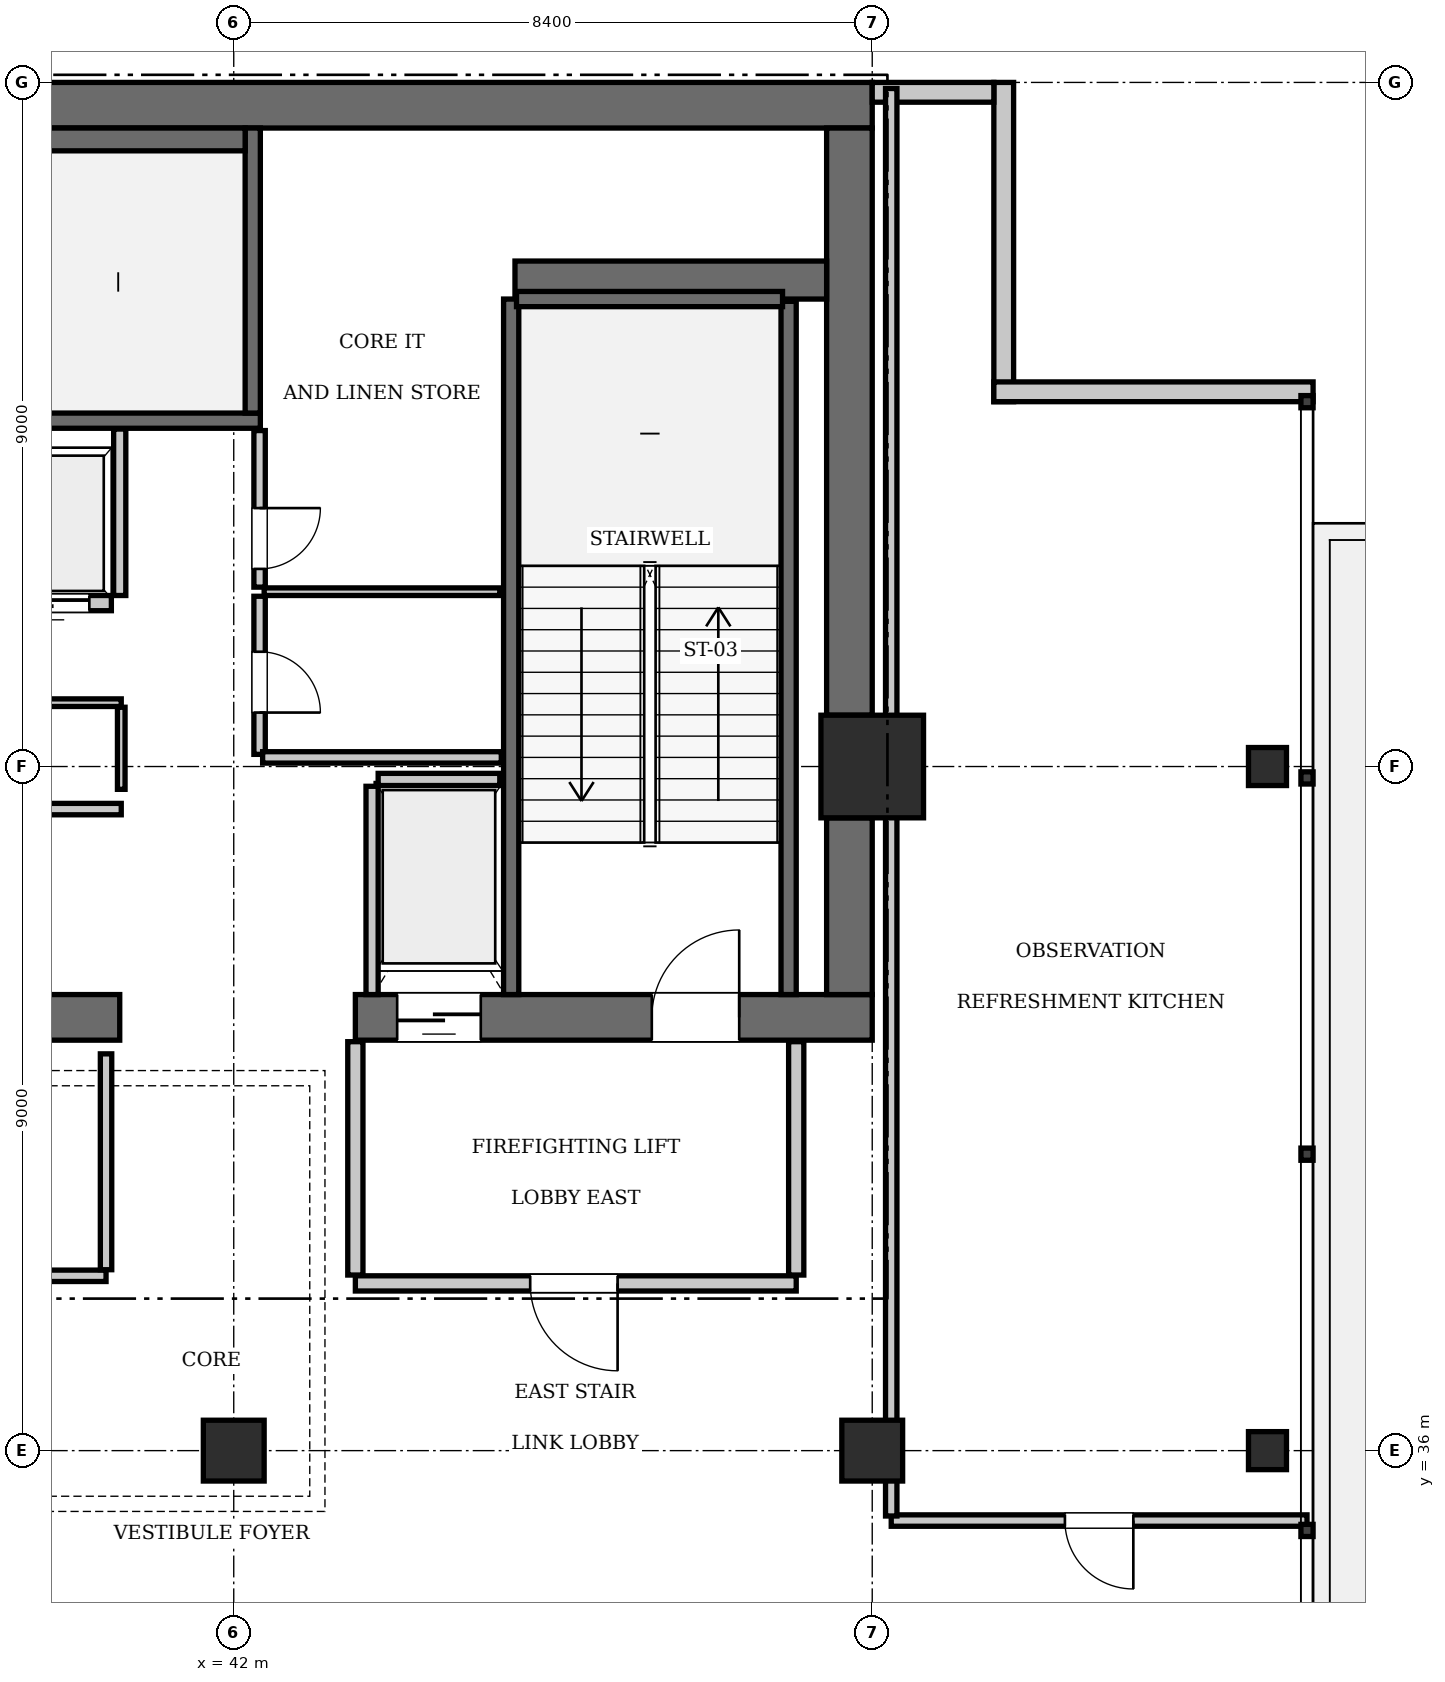
"""IFC4 building model, lengths in metres.
Left out: names, types, materials, properties, quantities, classifications, styles, units other than length and angle.
Written with IfcOpenShell. Run it as: python <this file> out.ifc"""

import sys

from ifc_helpers import new_model, si_unit, direction, frame, frame_2d, origin, origin_2d, place, context, subcontext, project, spatial, rectangle, i_section, extrude, element, fill, save


model = new_model("IFC4")
c1 = context("Model", 3, precision=1e-05, world=origin(), true_north=direction((0.0, 1.0)))
c2 = subcontext(c1, "Body", "Model", "MODEL_VIEW")
j1 = project(units=[si_unit("LENGTHUNIT", "METRE"), si_unit("PLANEANGLEUNIT", "RADIAN")], contexts=[c1])
p1 = place(None, origin())
s1 = spatial("IfcSite", under=j1, at=p1, CompositionType="ELEMENT")
p2 = place(p1, origin())
s2 = spatial("IfcBuilding", under=s1, at=p2, CompositionType="ELEMENT")
p3 = place(p2, frame((0.0, 0.0, 354.2)))
s3 = spatial("IfcBuildingStorey", under=s2, at=p3, CompositionType="ELEMENT", Elevation=354.2)
p4 = place(p3, frame((50.4, 45.0, 0.0), z_axis=(0.0, 0.0, 1.0), x_axis=(1.0, 0.0, 0.0)))
e1 = element("IfcColumn", 1, at=p4, inside=s3, PredefinedType="COLUMN", context=c2, shape_type="SweptSolid", body=[
    extrude(rectangle(XDim=1.35, YDim=1.35, at=origin_2d()), origin(), (0.0, 0.0, 1.0), 4.9),
])
p5 = place(p3, frame((25.2, 53.7, 0.0), z_axis=(0.0, 0.0, 1.0), x_axis=(1.0, 0.0, 0.0)))
e2 = element("IfcWall", 2, at=p5, inside=s3, PredefinedType="SHEAR", context=c2, shape_type="SweptSolid", body=[
    extrude(rectangle(XDim=25.2, YDim=0.6, at=frame_2d((12.6, 0.0))), origin(), (0.0, 0.0, 1.0), 4.9),
])
p6 = place(p3, frame((35.1, 41.7, 0.0), z_axis=(0.0, 0.0, 1.0), x_axis=(1.0, 0.0, 0.0)))
e3 = element("IfcWall", 3, at=p6, inside=s3, PredefinedType="SHEAR", context=c2, shape_type="SweptSolid", body=[
    extrude(rectangle(XDim=5.4, YDim=0.6, at=frame_2d((2.7, 0.0))), origin(), (0.0, 0.0, 1.0), 4.9),
])
p7 = place(p3, frame((43.6, 41.7, 0.0), z_axis=(0.0, 0.0, 1.0), x_axis=(1.0, 0.0, 0.0)))
e4 = element("IfcWall", 4, at=p7, inside=s3, PredefinedType="SHEAR", context=c2, shape_type="SweptSolid", body=[
    extrude(rectangle(XDim=6.8, YDim=0.6, at=frame_2d((3.4, 0.0))), origin(), (0.0, 0.0, 1.0), 4.9),
])
p8 = place(p7, frame((3.9, 0.0, 0.0)))
e5 = element("IfcOpeningElement", 5, at=p8, cuts=e4, PredefinedType="OPENING", context=c2, shape_type="SweptSolid", body=[
    extrude(rectangle(XDim=1.15, YDim=2.15, at=frame_2d((0.575, 1.075))), frame((0.0, 0.31, 0.0), z_axis=(0.0, -1.0, 0.0), x_axis=(1.0, 0.0, 0.0)), (0.0, 0.0, 1.0), 0.62),
])
p9 = place(p7, frame((0.55, 0.0, 0.0)))
e6 = element("IfcOpeningElement", 6, at=p9, cuts=e4, PredefinedType="OPENING", context=c2, shape_type="SweptSolid", body=[
    extrude(rectangle(XDim=1.1, YDim=2.2, at=frame_2d((0.55, 1.1))), frame((0.0, 0.31, 0.0), z_axis=(0.0, -1.0, 0.0), x_axis=(1.0, 0.0, 0.0)), (0.0, 0.0, 1.0), 0.62),
])
p10 = place(p3, frame((50.1, 42.0, 0.0), z_axis=(0.0, 0.0, 1.0), x_axis=(0.0, 1.0, 0.0)))
e7 = element("IfcWall", 7, at=p10, inside=s3, PredefinedType="SHEAR", context=c2, shape_type="SweptSolid", body=[
    extrude(rectangle(XDim=2.325, YDim=0.6, at=frame_2d((1.163, 0.0))), origin(), (0.0, 0.0, 1.0), 4.9),
])
p11 = place(p3, frame((50.1, 45.675, 0.0), z_axis=(0.0, 0.0, 1.0), x_axis=(0.0, 1.0, 0.0)))
e8 = element("IfcWall", 8, at=p11, inside=s3, PredefinedType="SHEAR", context=c2, shape_type="SweptSolid", body=[
    extrude(rectangle(XDim=7.725, YDim=0.6, at=frame_2d((3.862, 0.0))), origin(), (0.0, 0.0, 1.0), 4.9),
])
p12 = place(p3, frame((45.7, 51.4, 0.0), z_axis=(0.0, 0.0, 1.0), x_axis=(1.0, 0.0, 0.0)))
e9 = element("IfcWall", 9, at=p12, inside=s3, PredefinedType="SHEAR", context=c2, shape_type="SweptSolid", body=[
    extrude(rectangle(XDim=4.1, YDim=0.5, at=frame_2d((2.05, 0.0))), origin(), (0.0, 0.0, 1.0), 4.9),
])
for number, where, z_axis, x_axis in (
    (10, (42.0, 36.0, 0.0), (0.0, 0.0, 1.0), (1.0, 0.0, 0.0)),
    (11, (50.4, 36.0, 0.0), (0.0, 0.0, 1.0), (1.0, 0.0, 0.0)),
):
    element("IfcColumn", number, at=place(p3, frame(where, z_axis=z_axis, x_axis=x_axis)), inside=s3, PredefinedType="COLUMN", context=c2, shape_type="SweptSolid", body=[
        extrude(rectangle(XDim=0.8, YDim=0.8, at=origin_2d()), origin(), (0.0, 0.0, 1.0), 4.9),
    ])
for number, where, z_axis, x_axis in (
    (12, (55.6, 36.0, -0.26), (0.0, 0.0, 1.0), (1.0, 0.0, 0.0)),
    (13, (55.6, 45.0, -0.26), (0.0, 0.0, 1.0), (1.0, 0.0, 0.0)),
):
    element("IfcColumn", number, at=place(p3, frame(where, z_axis=z_axis, x_axis=x_axis)), inside=s3, PredefinedType="COLUMN", context=c2, shape_type="SweptSolid", body=[
        extrude(i_section(OverallWidth=0.5, OverallDepth=0.5, WebThickness=0.022, FlangeThickness=0.032, at=origin_2d()), origin(), (0.0, 0.0, 1.0), 5.16),
    ])
p13 = place(p3, frame((33.25, 49.55, 0.0), z_axis=(0.0, 0.0, 1.0), x_axis=(1.0, 0.0, 0.0)))
e14 = element("IfcWall", 14, at=p13, inside=s3, PredefinedType="SOLIDWALL", context=c2, shape_type="SweptSolid", body=[
    extrude(rectangle(XDim=9.1, YDim=0.2, at=frame_2d((4.55, 0.0))), origin(), (0.0, 0.0, 1.0), 4.64),
])
p14 = place(p3, frame((42.25, 49.65, 0.0), z_axis=(0.0, 0.0, 1.0), x_axis=(0.0, 1.0, 0.0)))
e15 = element("IfcWall", 15, at=p14, inside=s3, PredefinedType="SOLIDWALL", context=c2, shape_type="SweptSolid", body=[
    extrude(rectangle(XDim=3.75, YDim=0.2, at=frame_2d((1.875, 0.0))), origin(), (0.0, 0.0, 1.0), 4.64),
])
p15 = place(p3, frame((33.45, 53.25, 0.0), z_axis=(0.0, 0.0, 1.0), x_axis=(1.0, 0.0, 0.0)))
e16 = element("IfcWall", 16, at=p15, inside=s3, PredefinedType="SOLIDWALL", context=c2, shape_type="SweptSolid", body=[
    extrude(rectangle(XDim=8.7, YDim=0.3, at=frame_2d((4.35, 0.0))), origin(), (0.0, 0.0, 1.0), 4.64),
])
p16 = place(p3, frame((45.65, 42.0, 0.0), z_axis=(0.0, 0.0, 1.0), x_axis=(0.0, 1.0, 0.0)))
e17 = element("IfcWall", 17, at=p16, inside=s3, PredefinedType="SOLIDWALL", context=c2, shape_type="SweptSolid", body=[
    extrude(rectangle(XDim=9.15, YDim=0.2, at=frame_2d((4.575, 0.0))), origin(), (0.0, 0.0, 1.0), 4.64),
])
p17 = place(p3, frame((49.3, 42.0, 0.0), z_axis=(0.0, 0.0, 1.0), x_axis=(0.0, 1.0, 0.0)))
e18 = element("IfcWall", 18, at=p17, inside=s3, PredefinedType="SOLIDWALL", context=c2, shape_type="SweptSolid", body=[
    extrude(rectangle(XDim=9.12, YDim=0.2, at=frame_2d((4.56, 0.0))), origin(), (0.0, 0.0, 1.0), 4.64),
])
p18 = place(p3, frame((45.72, 51.15, 0.0), z_axis=(0.0, 0.0, 1.0), x_axis=(1.0, 0.0, 0.0)))
e19 = element("IfcWall", 19, at=p18, inside=s3, PredefinedType="SOLIDWALL", context=c2, shape_type="SweptSolid", body=[
    extrude(rectangle(XDim=3.5, YDim=0.2, at=frame_2d((1.75, 0.0))), origin(), (0.0, 0.0, 1.0), 4.64),
])
p19 = place(p3, frame((38.71, 47.15, 0.0), z_axis=(0.0, 0.0, 1.0), x_axis=(1.0, 0.0, 0.0)))
e20 = element("IfcWall", 20, at=p19, inside=s3, PredefinedType="SOLIDWALL", context=c2, shape_type="SweptSolid", body=[
    extrude(rectangle(XDim=1.68, YDim=0.2, at=frame_2d((0.84, 0.0))), origin(), (0.0, 0.0, 1.0), 4.64),
])
p20 = place(p19, frame((0.29, 0.0, 0.0)))
e21 = element("IfcOpeningElement", 21, at=p20, cuts=e20, PredefinedType="OPENING", context=c2, shape_type="SweptSolid", body=[
    extrude(rectangle(XDim=1.1, YDim=2.2, at=frame_2d((0.55, 1.1))), frame((0.0, 0.11, 0.0), z_axis=(0.0, -1.0, 0.0), x_axis=(1.0, 0.0, 0.0)), (0.0, 0.0, 1.0), 0.22),
])
p21 = place(p3, frame((43.9, 44.83, 0.0), z_axis=(0.0, 0.0, 1.0), x_axis=(1.0, 0.0, 0.0)))
e22 = element("IfcWall", 22, at=p21, inside=s3, PredefinedType="SOLIDWALL", context=c2, shape_type="SweptSolid", body=[
    extrude(rectangle(XDim=1.6, YDim=0.16, at=frame_2d((0.8, 0.0))), origin(), (0.0, 0.0, 1.0), 4.64),
])
p22 = place(p3, frame((43.82, 42.0, 0.0), z_axis=(0.0, 0.0, 1.0), x_axis=(0.0, 1.0, 0.0)))
e23 = element("IfcWall", 23, at=p22, inside=s3, PredefinedType="SOLIDWALL", context=c2, shape_type="SweptSolid", body=[
    extrude(rectangle(XDim=2.74, YDim=0.16, at=frame_2d((1.37, 0.0))), origin(), (0.0, 0.0, 1.0), 4.64),
])
p23 = place(p3, frame((40.5, 47.25, 0.0), z_axis=(0.0, 0.0, 1.0), x_axis=(0.0, 1.0, 0.0)))
e24 = element("IfcWall", 24, at=p23, inside=s3, PredefinedType="SOLIDWALL", context=c2, shape_type="SweptSolid", body=[
    extrude(rectangle(XDim=2.19, YDim=0.16, at=frame_2d((1.095, 0.0))), origin(), (0.0, 0.0, 1.0), 4.64),
])
for number, where, z_axis, x_axis in (
    (25, (52.13, 54.0, 0.0), (0.0, 0.0, 1.0), (0.0, -1.0, 0.0)),
    (26, (52.0, 49.93, 0.0), (0.0, 0.0, 1.0), (1.0, 0.0, 0.0)),
):
    element("IfcWall", number, at=place(p3, frame(where, z_axis=z_axis, x_axis=x_axis)), inside=s3, PredefinedType="SOLIDWALL", context=c2, shape_type="SweptSolid", body=[
        extrude(rectangle(XDim=4.2, YDim=0.26, at=frame_2d((2.1, 0.0))), origin(), (0.0, 0.0, 1.0), 4.64),
    ])
p24 = place(p3, frame((52.0, 53.87, 0.0), z_axis=(0.0, 0.0, 1.0), x_axis=(-1.0, 0.0, 0.0)))
e27 = element("IfcWall", 27, at=p24, inside=s3, PredefinedType="SOLIDWALL", context=c2, shape_type="SweptSolid", body=[
    extrude(rectangle(XDim=1.6, YDim=0.26, at=frame_2d((0.8, 0.0))), origin(), (0.0, 0.0, 1.0), 4.64),
])
p25 = place(p3, frame((43.6, 38.2, 0.0), z_axis=(0.0, 0.0, 1.0), x_axis=(1.0, 0.0, 0.0)))
e28 = element("IfcWall", 28, at=p25, inside=s3, PredefinedType="PARTITIONING", context=c2, shape_type="SweptSolid", body=[
    extrude(rectangle(XDim=5.8, YDim=0.2, at=frame_2d((2.9, 0.0))), origin(), (0.0, 0.0, 1.0), 4.64),
])
p26 = place(p25, frame((2.3, 0.0, 0.0)))
e29 = element("IfcOpeningElement", 29, at=p26, cuts=e28, PredefinedType="OPENING", context=c2, shape_type="SweptSolid", body=[
    extrude(rectangle(XDim=1.15, YDim=2.15, at=frame_2d((0.575, 1.075))), frame((0.0, 0.11, 0.0), z_axis=(0.0, -1.0, 0.0), x_axis=(1.0, 0.0, 0.0)), (0.0, 0.0, 1.0), 0.22),
])
for number, where, z_axis, x_axis in (
    (30, (43.6, 38.31, 0.0), (0.0, 0.0, 1.0), (0.0, 1.0, 0.0)),
    (31, (49.4, 38.31, 0.0), (0.0, 0.0, 1.0), (0.0, 1.0, 0.0)),
):
    element("IfcWall", number, at=place(p3, frame(where, z_axis=z_axis, x_axis=x_axis)), inside=s3, PredefinedType="PARTITIONING", context=c2, shape_type="SweptSolid", body=[
        extrude(rectangle(XDim=3.07, YDim=0.2, at=frame_2d((1.535, 0.0))), origin(), (0.0, 0.0, 1.0), 4.64),
    ])
p27 = place(p3, frame((35.58, 45.84, 0.0), z_axis=(0.0, 0.0, 1.0), x_axis=(1.0, 0.0, 0.0)))
e32 = element("IfcWall", 32, at=p27, inside=s3, PredefinedType="PARTITIONING", context=c2, shape_type="SweptSolid", body=[
    extrude(rectangle(XDim=4.94, YDim=0.1, at=frame_2d((2.47, 0.0))), origin(), (0.0, 0.0, 1.0), 4.64),
])
p28 = place(p27, frame((1.8, 0.0, 0.0)))
e33 = element("IfcOpeningElement", 33, at=p28, cuts=e32, PredefinedType="OPENING", context=c2, shape_type="SweptSolid", body=[
    extrude(rectangle(XDim=0.8, YDim=2.05, at=frame_2d((0.4, 1.025))), frame((0.0, 0.06, 0.0), z_axis=(0.0, -1.0, 0.0), x_axis=(1.0, 0.0, 0.0)), (0.0, 0.0, 1.0), 0.12),
])
p29 = place(p3, frame((40.52, 44.7, 0.0), z_axis=(0.0, 0.0, 1.0), x_axis=(0.0, 1.0, 0.0)))
e34 = element("IfcWall", 34, at=p29, inside=s3, PredefinedType="PARTITIONING", context=c2, shape_type="SweptSolid", body=[
    extrude(rectangle(XDim=1.08, YDim=0.1, at=frame_2d((0.54, 0.0))), origin(), (0.0, 0.0, 1.0), 4.64),
])
p30 = place(p3, frame((38.04, 44.44, 0.0), z_axis=(0.0, 0.0, 1.0), x_axis=(1.0, 0.0, 0.0)))
e35 = element("IfcWall", 35, at=p30, inside=s3, PredefinedType="PARTITIONING", context=c2, shape_type="SweptSolid", body=[
    extrude(rectangle(XDim=2.48, YDim=0.15, at=frame_2d((1.24, 0.0))), origin(), (0.0, 0.0, 1.0), 4.64),
])
p31 = place(p30, frame((0.75, 0.0, 0.0)))
e36 = element("IfcOpeningElement", 36, at=p31, cuts=e35, PredefinedType="OPENING", context=c2, shape_type="SweptSolid", body=[
    extrude(rectangle(XDim=0.8, YDim=2.05, at=frame_2d((0.4, 1.025))), frame((0.0, 0.085, 0.0), z_axis=(0.0, -1.0, 0.0), x_axis=(1.0, 0.0, 0.0)), (0.0, 0.0, 1.0), 0.17),
])
p32 = place(p3, frame((42.34, 45.16, 0.0), z_axis=(0.0, 0.0, 1.0), x_axis=(0.0, 1.0, 0.0)))
e37 = element("IfcWall", 37, at=p32, inside=s3, PredefinedType="PARTITIONING", context=c2, shape_type="SweptSolid", body=[
    extrude(rectangle(XDim=2.08, YDim=0.15, at=frame_2d((1.04, 0.0))), origin(), (0.0, 0.0, 1.0), 4.64),
])
p33 = place(p32, frame((0.55, 0.0, 0.0)))
e38 = element("IfcOpeningElement", 38, at=p33, cuts=e37, PredefinedType="OPENING", context=c2, shape_type="SweptSolid", body=[
    extrude(rectangle(XDim=0.8, YDim=2.05, at=frame_2d((0.4, 1.025))), frame((0.0, 0.085, 0.0), z_axis=(0.0, -1.0, 0.0), x_axis=(1.0, 0.0, 0.0)), (0.0, 0.0, 1.0), 0.17),
])
p34 = place(p3, frame((42.34, 47.36, 0.0), z_axis=(0.0, 0.0, 1.0), x_axis=(0.0, 1.0, 0.0)))
e39 = element("IfcWall", 39, at=p34, inside=s3, PredefinedType="PARTITIONING", context=c2, shape_type="SweptSolid", body=[
    extrude(rectangle(XDim=2.06, YDim=0.15, at=frame_2d((1.03, 0.0))), origin(), (0.0, 0.0, 1.0), 4.64),
])
p35 = place(p34, frame((0.24, 0.0, 0.0)))
e40 = element("IfcOpeningElement", 40, at=p35, cuts=e39, PredefinedType="OPENING", context=c2, shape_type="SweptSolid", body=[
    extrude(rectangle(XDim=0.8, YDim=2.05, at=frame_2d((0.4, 1.025))), frame((0.0, 0.085, 0.0), z_axis=(0.0, -1.0, 0.0), x_axis=(1.0, 0.0, 0.0)), (0.0, 0.0, 1.0), 0.17),
])
p36 = place(p3, frame((42.4, 47.3, 0.0), z_axis=(0.0, 0.0, 1.0), x_axis=(1.0, 0.0, 0.0)))
e41 = element("IfcWall", 41, at=p36, inside=s3, PredefinedType="PARTITIONING", context=c2, shape_type="SweptSolid", body=[
    extrude(rectangle(XDim=3.1, YDim=0.1, at=frame_2d((1.55, 0.0))), origin(), (0.0, 0.0, 1.0), 4.64),
])
p37 = place(p3, frame((42.38, 45.12, 0.0), z_axis=(0.0, 0.0, 1.0), x_axis=(1.0, 0.0, 0.0)))
e42 = element("IfcWall", 42, at=p37, inside=s3, PredefinedType="PARTITIONING", context=c2, shape_type="SweptSolid", body=[
    extrude(rectangle(XDim=3.14, YDim=0.15, at=frame_2d((1.57, 0.0))), origin(), (0.0, 0.0, 1.0), 4.64),
])
p38 = place(p3, frame((34.4, 38.3, 0.0), z_axis=(0.0, 0.0, 1.0), x_axis=(1.0, 0.0, 0.0)))
e43 = element("IfcWall", 43, at=p38, inside=s3, PredefinedType="PARTITIONING", context=c2, shape_type="SweptSolid", body=[
    extrude(rectangle(XDim=5.92, YDim=0.15, at=frame_2d((2.96, 0.0))), origin(), (0.0, 0.0, 1.0), 4.64),
])
p39 = place(p38, frame((2.4, 0.0, 0.0)))
e44 = element("IfcOpeningElement", 44, at=p39, cuts=e43, PredefinedType="OPENING", context=c2, shape_type="SweptSolid", body=[
    extrude(rectangle(XDim=0.9, YDim=2.1, at=frame_2d((0.45, 1.05))), frame((0.0, 0.085, 0.0), z_axis=(0.0, -1.0, 0.0), x_axis=(1.0, 0.0, 0.0)), (0.0, 0.0, 1.0), 0.17),
])
p40 = place(p3, frame((40.32, 38.38, 0.0), z_axis=(0.0, 0.0, 1.0), x_axis=(0.0, 1.0, 0.0)))
e45 = element("IfcWall", 45, at=p40, inside=s3, PredefinedType="PARTITIONING", context=c2, shape_type="SweptSolid", body=[
    extrude(rectangle(XDim=2.84, YDim=0.15, at=frame_2d((1.42, 0.0))), origin(), (0.0, 0.0, 1.0), 4.64),
])
p41 = place(p3, frame((50.65, 35.08, 0.0), z_axis=(0.0, 0.0, 1.0), x_axis=(1.0, 0.0, 0.0)))
e46 = element("IfcWall", 46, at=p41, inside=s3, PredefinedType="PARTITIONING", context=c2, shape_type="SweptSolid", body=[
    extrude(rectangle(XDim=5.47, YDim=0.15, at=frame_2d((2.735, 0.0))), origin(), (0.0, 0.0, 1.0), 4.64),
])
p42 = place(p41, frame((2.285, 0.0, 0.0)))
e47 = element("IfcOpeningElement", 47, at=p42, cuts=e46, PredefinedType="OPENING", context=c2, shape_type="SweptSolid", body=[
    extrude(rectangle(XDim=0.9, YDim=2.1, at=frame_2d((0.45, 1.05))), frame((0.0, 0.085, 0.0), z_axis=(0.0, -1.0, 0.0), x_axis=(1.0, 0.0, 0.0)), (0.0, 0.0, 1.0), 0.17),
])
p43 = place(p3, frame((50.65, 35.14, 0.0), z_axis=(0.0, 0.0, 1.0), x_axis=(0.0, 1.0, 0.0)))
e48 = element("IfcWall", 48, at=p43, inside=s3, PredefinedType="PARTITIONING", context=c2, shape_type="SweptSolid", body=[
    extrude(rectangle(XDim=18.78, YDim=0.15, at=frame_2d((9.39, 0.0))), origin(), (0.0, 0.0, 1.0), 4.64),
])
p44 = place(p8, origin())
e49 = element("IfcDoor", 49, at=p44, inside=s3, OperationType="SINGLE_SWING_RIGHT", PredefinedType="DOOR", context=c2, shape_type="SweptSolid", body=[
    extrude(rectangle(XDim=1.15, YDim=2.15, at=frame_2d((0.575, 1.075))), frame((0.0, 0.025, 0.0), z_axis=(0.0, -1.0, 0.0), x_axis=(1.0, 0.0, 0.0)), (0.0, 0.0, 1.0), 0.05),
])
fill(e5, e49)
p45 = place(p20, frame((1.1, 0.0, 0.0), z_axis=(0.0, 0.0, 1.0), x_axis=(-1.0, 0.0, 0.0)))
e50 = element("IfcDoor", 50, at=p45, inside=s3, OperationType="SLIDING_TO_RIGHT", PredefinedType="DOOR", context=c2, shape_type="SweptSolid", body=[
    extrude(rectangle(XDim=1.1, YDim=2.2, at=frame_2d((0.55, 1.1))), frame((0.0, 0.025, 0.0), z_axis=(0.0, -1.0, 0.0), x_axis=(1.0, 0.0, 0.0)), (0.0, 0.0, 1.0), 0.05),
])
fill(e21, e50)
p46 = place(p9, frame((1.1, 0.0, 0.0), z_axis=(0.0, 0.0, 1.0), x_axis=(-1.0, 0.0, 0.0)))
e51 = element("IfcDoor", 51, at=p46, inside=s3, OperationType="SLIDING_TO_LEFT", PredefinedType="DOOR", context=c2, shape_type="SweptSolid", body=[
    extrude(rectangle(XDim=1.1, YDim=2.2, at=frame_2d((0.55, 1.1))), frame((0.0, 0.025, 0.0), z_axis=(0.0, -1.0, 0.0), x_axis=(1.0, 0.0, 0.0)), (0.0, 0.0, 1.0), 0.05),
])
fill(e6, e51)
p47 = place(p26, frame((1.15, 0.0, 0.0), z_axis=(0.0, 0.0, 1.0), x_axis=(-1.0, 0.0, 0.0)))
e52 = element("IfcDoor", 52, at=p47, inside=s3, OperationType="SINGLE_SWING_LEFT", PredefinedType="DOOR", context=c2, shape_type="SweptSolid", body=[
    extrude(rectangle(XDim=1.15, YDim=2.15, at=frame_2d((0.575, 1.075))), frame((0.0, 0.025, 0.0), z_axis=(0.0, -1.0, 0.0), x_axis=(1.0, 0.0, 0.0)), (0.0, 0.0, 1.0), 0.05),
])
fill(e29, e52)
p48 = place(p33, frame((0.8, 0.0, 0.0), z_axis=(0.0, 0.0, 1.0), x_axis=(-1.0, 0.0, 0.0)))
e53 = element("IfcDoor", 53, at=p48, inside=s3, OperationType="SINGLE_SWING_RIGHT", PredefinedType="DOOR", context=c2, shape_type="SweptSolid", body=[
    extrude(rectangle(XDim=0.8, YDim=2.05, at=frame_2d((0.4, 1.025))), frame((0.0, 0.025, 0.0), z_axis=(0.0, -1.0, 0.0), x_axis=(1.0, 0.0, 0.0)), (0.0, 0.0, 1.0), 0.05),
])
fill(e38, e53)
p49 = place(p35, frame((0.8, 0.0, 0.0), z_axis=(0.0, 0.0, 1.0), x_axis=(-1.0, 0.0, 0.0)))
e54 = element("IfcDoor", 54, at=p49, inside=s3, OperationType="SINGLE_SWING_LEFT", PredefinedType="DOOR", context=c2, shape_type="SweptSolid", body=[
    extrude(rectangle(XDim=0.8, YDim=2.05, at=frame_2d((0.4, 1.025))), frame((0.0, 0.025, 0.0), z_axis=(0.0, -1.0, 0.0), x_axis=(1.0, 0.0, 0.0)), (0.0, 0.0, 1.0), 0.05),
])
fill(e40, e54)
p50 = place(p42, frame((0.9, 0.0, 0.0), z_axis=(0.0, 0.0, 1.0), x_axis=(-1.0, 0.0, 0.0)))
e55 = element("IfcDoor", 55, at=p50, inside=s3, OperationType="SINGLE_SWING_LEFT", PredefinedType="DOOR", context=c2, shape_type="SweptSolid", body=[
    extrude(rectangle(XDim=0.9, YDim=2.1, at=frame_2d((0.45, 1.05))), frame((0.0, 0.025, 0.0), z_axis=(0.0, -1.0, 0.0), x_axis=(1.0, 0.0, 0.0)), (0.0, 0.0, 1.0), 0.05),
])
fill(e47, e55)
save(model, sys.argv[1])
